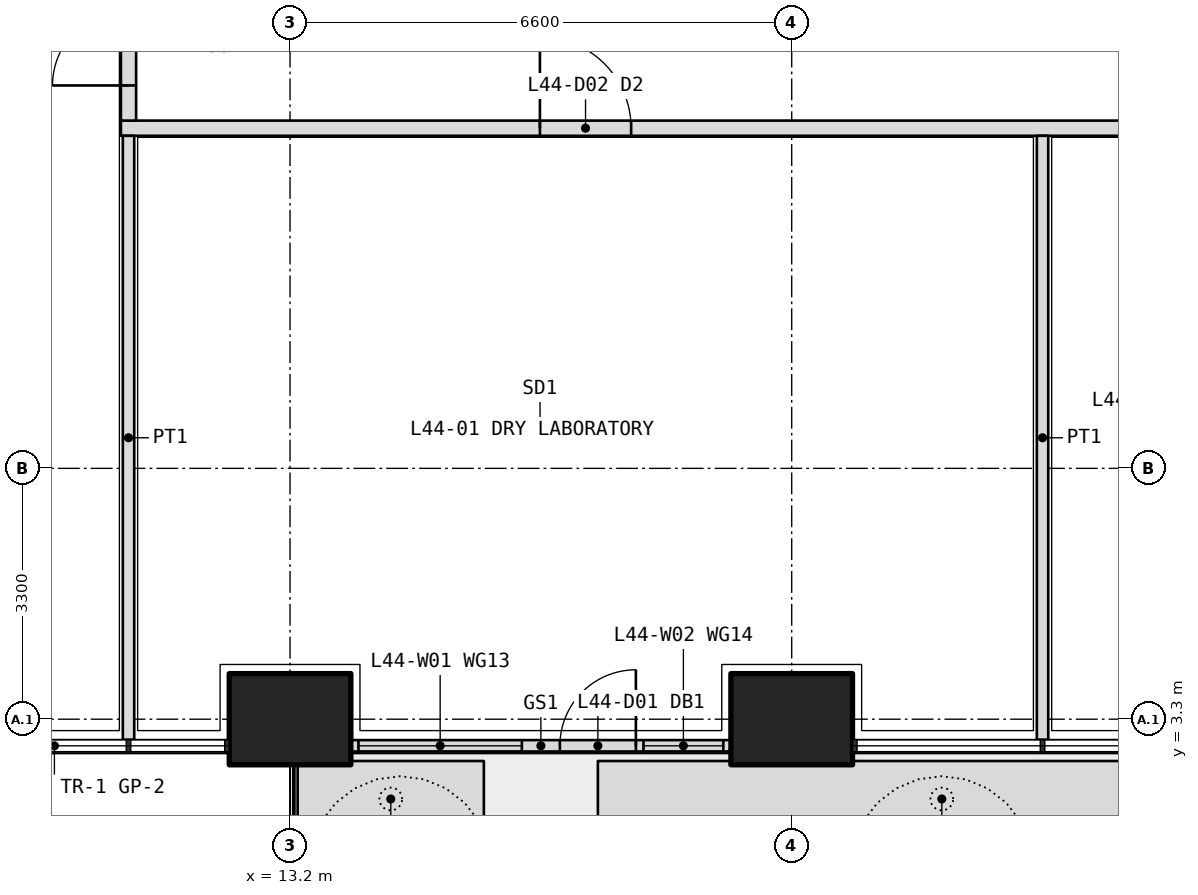
"""IFC4 building model, lengths in metres.
Left out: names, types, materials, properties, quantities, classifications, styles, units other than length and angle.
Written with IfcOpenShell. Run it as: python <this file> out.ifc"""

import sys

from ifc_helpers import new_model, si_unit, direction, frame, frame_2d, origin, origin_2d, place, context, subcontext, project, spatial, polyline, rectangle, outline, extrude, element, fill, save


model = new_model("IFC4")
c1 = context("Model", 3, precision=1e-05, world=origin(), true_north=direction((0.0, 1.0)))
c2 = subcontext(c1, "Body", "Model", "MODEL_VIEW")
j1 = project(units=[si_unit("LENGTHUNIT", "METRE"), si_unit("PLANEANGLEUNIT", "RADIAN")], contexts=[c1])
p1 = place(None, origin())
s1 = spatial("IfcSite", under=j1, at=p1, CompositionType="ELEMENT")
p2 = place(p1, origin())
s2 = spatial("IfcBuilding", under=s1, at=p2, CompositionType="ELEMENT")
p3 = place(p2, frame((0.0, 0.0, 193.5)))
s3 = spatial("IfcBuildingStorey", under=s2, at=p3, CompositionType="ELEMENT", Elevation=193.5)
for number, where, z_axis, x_axis in (
    (1, (13.2, 3.3, 0.0), (0.0, 0.0, 1.0), (1.0, 0.0, 0.0)),
    (2, (19.8, 3.3, 0.0), (0.0, 0.0, 1.0), (1.0, 0.0, 0.0)),
):
    element("IfcColumn", number, at=place(p3, frame(where, z_axis=z_axis, x_axis=x_axis)), inside=s3, PredefinedType="COLUMN", context=c2, shape_type="SweptSolid", body=[
        extrude(rectangle(XDim=1.6, YDim=1.2, at=origin_2d()), origin(), (0.0, 0.0, 1.0), 4.2),
    ])
p4 = place(p3, origin())
e3 = element("IfcWall", 3, at=p4, inside=s3, PredefinedType="USERDEFINED", context=c2, shape_type="SweptSolid", body=[
    extrude(outline(polyline([(13.3, 1.75), (15.75, 1.75), (15.75, 2.75), (13.3, 2.75), (13.3, 1.75)]), holes=[polyline([(13.45, 1.9), (15.6, 1.9), (15.6, 2.6), (13.45, 2.6), (13.45, 1.9)])]), origin(), (0.0, 0.0, 1.0), 1.05),
])
p5 = place(p3, origin())
e4 = element("IfcWall", 4, at=p5, inside=s3, PredefinedType="USERDEFINED", context=c2, shape_type="SweptSolid", body=[
    extrude(outline(polyline([(17.25, 1.75), (26.3, 1.75), (26.3, 2.75), (17.25, 2.75), (17.25, 1.75)]), holes=[polyline([(17.4, 1.9), (26.15, 1.9), (26.15, 2.6), (17.4, 2.6), (17.4, 1.9)])]), origin(), (0.0, 0.0, 1.0), 1.05),
])
p6 = place(p3, frame((14.0, 2.95, 0.0), z_axis=(0.0, 0.0, 1.0), x_axis=(1.0, 0.0, 0.0)))
e5 = element("IfcWall", 5, at=p6, inside=s3, PredefinedType="SOLIDWALL", context=c2, shape_type="SweptSolid", body=[
    extrude(rectangle(XDim=5.0, YDim=0.15, at=frame_2d((2.5, 0.0))), origin(), (0.0, 0.0, 1.0), 2.7),
])
p7 = place(p6, frame((2.75, 0.0, 0.0)))
e6 = element("IfcOpeningElement", 6, at=p7, cuts=e5, PredefinedType="OPENING", context=c2, shape_type="SweptSolid", body=[
    extrude(rectangle(XDim=1.0, YDim=2.4, at=frame_2d((0.5, 1.2))), frame((0.0, 0.085, 0.0), z_axis=(0.0, -1.0, 0.0), x_axis=(1.0, 0.0, 0.0)), (0.0, 0.0, 1.0), 0.17),
])
p8 = place(p6, frame((0.1, 0.0, 0.1)))
e7 = element("IfcOpeningElement", 7, at=p8, cuts=e5, PredefinedType="OPENING", context=c2, shape_type="SweptSolid", body=[
    extrude(rectangle(XDim=2.15, YDim=2.3, at=frame_2d((1.075, 1.15))), frame((0.0, 0.085, 0.0), z_axis=(0.0, -1.0, 0.0), x_axis=(1.0, 0.0, 0.0)), (0.0, 0.0, 1.0), 0.17),
])
p9 = place(p6, frame((3.85, 0.0, 0.1)))
e8 = element("IfcOpeningElement", 8, at=p9, cuts=e5, PredefinedType="OPENING", context=c2, shape_type="SweptSolid", body=[
    extrude(rectangle(XDim=1.05, YDim=2.3, at=frame_2d((0.525, 1.15))), frame((0.0, 0.085, 0.0), z_axis=(0.0, -1.0, 0.0), x_axis=(1.0, 0.0, 0.0)), (0.0, 0.0, 1.0), 0.17),
])
p10 = place(p3, frame((10.975, 11.075, 0.0), z_axis=(0.0, 0.0, 1.0), x_axis=(1.0, 0.0, 0.0)))
e9 = element("IfcWall", 9, at=p10, inside=s3, PredefinedType="PARTITIONING", context=c2, shape_type="SweptSolid", body=[
    extrude(rectangle(XDim=30.85, YDim=0.2, at=frame_2d((15.425, 0.0))), origin(), (0.0, 0.0, 1.0), 2.85),
])
p11 = place(p10, frame((5.512, 0.0, 0.0)))
e10 = element("IfcOpeningElement", 10, at=p11, cuts=e9, PredefinedType="OPENING", context=c2, shape_type="SweptSolid", body=[
    extrude(rectangle(XDim=1.2, YDim=2.1, at=frame_2d((0.6, 1.05))), frame((0.0, 0.11, 0.0), z_axis=(0.0, -1.0, 0.0), x_axis=(1.0, 0.0, 0.0)), (0.0, 0.0, 1.0), 0.22),
])
p12 = place(p10, frame((13.725, 0.0, 0.0)))
e11 = element("IfcOpeningElement", 11, at=p12, cuts=e9, PredefinedType="OPENING", context=c2, shape_type="SweptSolid", body=[
    extrude(rectangle(XDim=1.0, YDim=2.1, at=frame_2d((0.5, 1.05))), frame((0.0, 0.11, 0.0), z_axis=(0.0, -1.0, 0.0), x_axis=(1.0, 0.0, 0.0)), (0.0, 0.0, 1.0), 0.22),
])
p13 = place(p10, frame((17.025, 0.0, 0.0)))
e12 = element("IfcOpeningElement", 12, at=p13, cuts=e9, PredefinedType="OPENING", context=c2, shape_type="SweptSolid", body=[
    extrude(rectangle(XDim=1.0, YDim=2.1, at=frame_2d((0.5, 1.05))), frame((0.0, 0.11, 0.0), z_axis=(0.0, -1.0, 0.0), x_axis=(1.0, 0.0, 0.0)), (0.0, 0.0, 1.0), 0.22),
])
p14 = place(p10, frame((24.238, 0.0, 0.0)))
e13 = element("IfcOpeningElement", 13, at=p14, cuts=e9, PredefinedType="OPENING", context=c2, shape_type="SweptSolid", body=[
    extrude(rectangle(XDim=1.0, YDim=2.1, at=frame_2d((0.5, 1.05))), frame((0.0, 0.11, 0.0), z_axis=(0.0, -1.0, 0.0), x_axis=(1.0, 0.0, 0.0)), (0.0, 0.0, 1.0), 0.22),
])
p15 = place(p3, frame((11.075, 11.175, 0.0), z_axis=(0.0, 0.0, 1.0), x_axis=(0.0, 1.0, 0.0)))
e14 = element("IfcWall", 14, at=p15, inside=s3, PredefinedType="PARTITIONING", context=c2, shape_type="SweptSolid", body=[
    extrude(rectangle(XDim=23.85, YDim=0.2, at=frame_2d((11.925, 0.0))), origin(), (0.0, 0.0, 1.0), 2.85),
])
p16 = place(p15, frame((0.462, 0.0, 0.0)))
e15 = element("IfcOpeningElement", 15, at=p16, cuts=e14, PredefinedType="OPENING", context=c2, shape_type="SweptSolid", body=[
    extrude(rectangle(XDim=1.0, YDim=2.1, at=frame_2d((0.5, 1.05))), frame((0.0, 0.11, 0.0), z_axis=(0.0, -1.0, 0.0), x_axis=(1.0, 0.0, 0.0)), (0.0, 0.0, 1.0), 0.22),
])
p17 = place(p15, frame((3.125, 0.0, 0.0)))
e16 = element("IfcOpeningElement", 16, at=p17, cuts=e14, PredefinedType="OPENING", context=c2, shape_type="SweptSolid", body=[
    extrude(rectangle(XDim=1.0, YDim=2.1, at=frame_2d((0.5, 1.05))), frame((0.0, 0.11, 0.0), z_axis=(0.0, -1.0, 0.0), x_axis=(1.0, 0.0, 0.0)), (0.0, 0.0, 1.0), 0.22),
])
p18 = place(p15, frame((6.475, 0.0, 0.0)))
e17 = element("IfcOpeningElement", 17, at=p18, cuts=e14, PredefinedType="OPENING", context=c2, shape_type="SweptSolid", body=[
    extrude(rectangle(XDim=0.9, YDim=2.1, at=frame_2d((0.45, 1.05))), frame((0.0, 0.11, 0.0), z_axis=(0.0, -1.0, 0.0), x_axis=(1.0, 0.0, 0.0)), (0.0, 0.0, 1.0), 0.22),
])
p19 = place(p15, frame((9.675, 0.0, 0.0)))
e18 = element("IfcOpeningElement", 18, at=p19, cuts=e14, PredefinedType="OPENING", context=c2, shape_type="SweptSolid", body=[
    extrude(rectangle(XDim=0.9, YDim=2.1, at=frame_2d((0.45, 1.05))), frame((0.0, 0.11, 0.0), z_axis=(0.0, -1.0, 0.0), x_axis=(1.0, 0.0, 0.0)), (0.0, 0.0, 1.0), 0.22),
])
p20 = place(p15, frame((12.925, 0.0, 0.0)))
e19 = element("IfcOpeningElement", 19, at=p20, cuts=e14, PredefinedType="OPENING", context=c2, shape_type="SweptSolid", body=[
    extrude(rectangle(XDim=1.0, YDim=2.1, at=frame_2d((0.5, 1.05))), frame((0.0, 0.11, 0.0), z_axis=(0.0, -1.0, 0.0), x_axis=(1.0, 0.0, 0.0)), (0.0, 0.0, 1.0), 0.22),
])
p21 = place(p15, frame((17.925, 0.0, 0.0)))
e20 = element("IfcOpeningElement", 20, at=p21, cuts=e14, PredefinedType="OPENING", context=c2, shape_type="SweptSolid", body=[
    extrude(rectangle(XDim=1.2, YDim=2.1, at=frame_2d((0.6, 1.05))), frame((0.0, 0.11, 0.0), z_axis=(0.0, -1.0, 0.0), x_axis=(1.0, 0.0, 0.0)), (0.0, 0.0, 1.0), 0.22),
])
p22 = place(p15, frame((22.288, 0.0, 0.0)))
e21 = element("IfcOpeningElement", 21, at=p22, cuts=e14, PredefinedType="OPENING", context=c2, shape_type="SweptSolid", body=[
    extrude(rectangle(XDim=1.2, YDim=2.1, at=frame_2d((0.6, 1.05))), frame((0.0, 0.11, 0.0), z_axis=(0.0, -1.0, 0.0), x_axis=(1.0, 0.0, 0.0)), (0.0, 0.0, 1.0), 0.22),
])
for number, where, z_axis, x_axis in (
    (22, (11.075, 3.03, 0.0), (0.0, 0.0, 1.0), (0.0, 1.0, 0.0)),
    (23, (23.1, 3.03, 0.0), (0.0, 0.0, 1.0), (0.0, 1.0, 0.0)),
):
    element("IfcWall", number, at=place(p3, frame(where, z_axis=z_axis, x_axis=x_axis)), inside=s3, PredefinedType="PARTITIONING", context=c2, shape_type="SweptSolid", body=[
        extrude(rectangle(XDim=7.945, YDim=0.15, at=frame_2d((3.973, 0.0))), origin(), (0.0, 0.0, 1.0), 2.7),
    ])
p23 = place(p7, origin())
e24 = element("IfcDoor", 24, at=p23, inside=s3, OperationType="SINGLE_SWING_RIGHT", PredefinedType="DOOR", context=c2, shape_type="SweptSolid", body=[
    extrude(rectangle(XDim=1.0, YDim=2.4, at=frame_2d((0.5, 1.2))), frame((0.0, 0.025, 0.0), z_axis=(0.0, -1.0, 0.0), x_axis=(1.0, 0.0, 0.0)), (0.0, 0.0, 1.0), 0.05),
])
fill(e6, e24)
p24 = place(p8, origin())
e25 = element("IfcWindow", 25, at=p24, inside=s3, PartitioningType="SINGLE_PANEL", PredefinedType="WINDOW", context=c2, shape_type="SweptSolid", body=[
    extrude(rectangle(XDim=2.15, YDim=2.3, at=frame_2d((1.075, 1.15))), frame((0.0, 0.03, 0.0), z_axis=(0.0, -1.0, 0.0), x_axis=(1.0, 0.0, 0.0)), (0.0, 0.0, 1.0), 0.06),
])
fill(e7, e25)
p25 = place(p9, origin())
e26 = element("IfcWindow", 26, at=p25, inside=s3, PartitioningType="SINGLE_PANEL", PredefinedType="WINDOW", context=c2, shape_type="SweptSolid", body=[
    extrude(rectangle(XDim=1.05, YDim=2.3, at=frame_2d((0.525, 1.15))), frame((0.0, 0.03, 0.0), z_axis=(0.0, -1.0, 0.0), x_axis=(1.0, 0.0, 0.0)), (0.0, 0.0, 1.0), 0.06),
])
fill(e8, e26)
p26 = place(p11, origin())
e27 = element("IfcDoor", 27, at=p26, inside=s3, OperationType="DOUBLE_DOOR_SINGLE_SWING", PredefinedType="DOOR", context=c2, shape_type="SweptSolid", body=[
    extrude(rectangle(XDim=1.2, YDim=2.1, at=frame_2d((0.6, 1.05))), frame((0.0, 0.025, 0.0), z_axis=(0.0, -1.0, 0.0), x_axis=(1.0, 0.0, 0.0)), (0.0, 0.0, 1.0), 0.05),
])
fill(e10, e27)
p27 = place(p16, origin())
e28 = element("IfcDoor", 28, at=p27, inside=s3, OperationType="SINGLE_SWING_LEFT", PredefinedType="DOOR", context=c2, shape_type="SweptSolid", body=[
    extrude(rectangle(XDim=1.0, YDim=2.1, at=frame_2d((0.5, 1.05))), frame((0.0, 0.025, 0.0), z_axis=(0.0, -1.0, 0.0), x_axis=(1.0, 0.0, 0.0)), (0.0, 0.0, 1.0), 0.05),
])
fill(e15, e28)
save(model, sys.argv[1])
